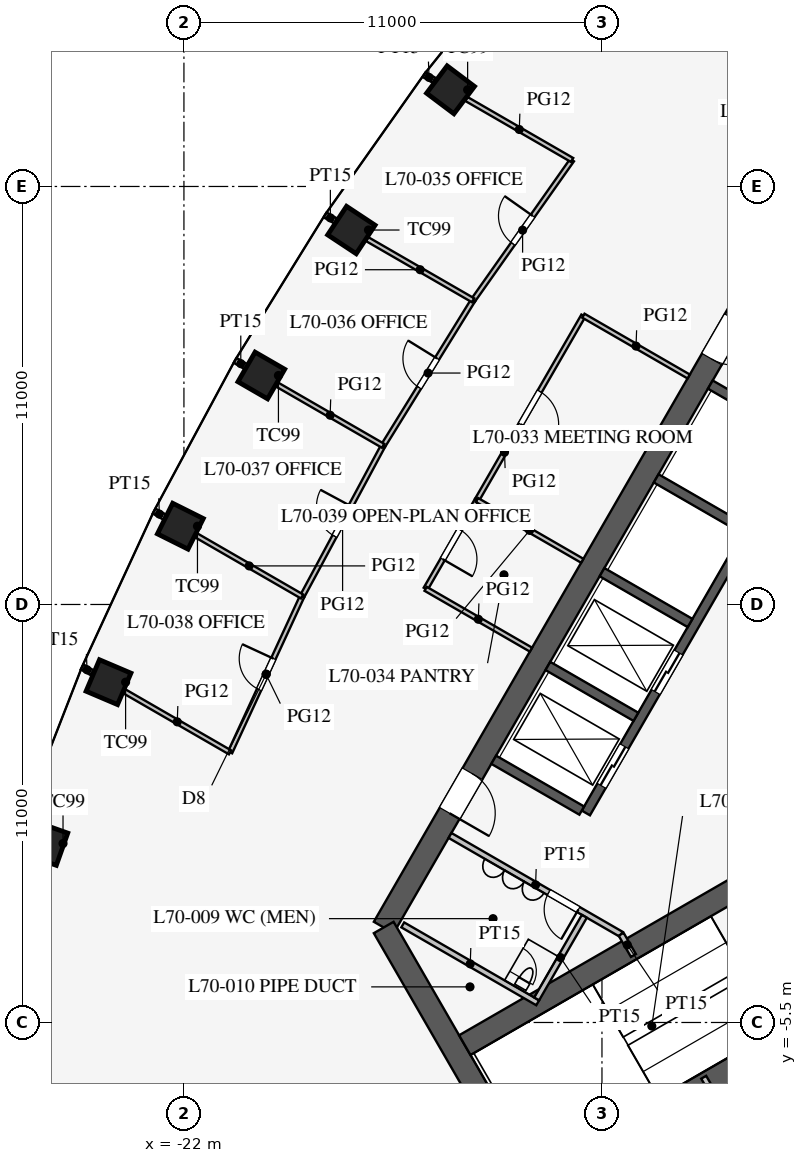
"""IFC4 building model, lengths in metres.
Left out: names, types, materials, properties, quantities, classifications, styles, units other than length and angle.
Written with IfcOpenShell. Run it as: python <this file> out.ifc"""

import sys

from ifc_helpers import new_model, si_unit, direction, frame, frame_2d, origin, origin_2d, place, context, subcontext, project, spatial, rectangle, extrude, element, fill, save


model = new_model("IFC4")
c1 = context("Model", 3, precision=1e-05, world=origin(), true_north=direction((0.0, 1.0)))
c2 = subcontext(c1, "Body", "Model", "MODEL_VIEW")
j1 = project(units=[si_unit("LENGTHUNIT", "METRE"), si_unit("PLANEANGLEUNIT", "RADIAN")], contexts=[c1])
p1 = place(None, origin())
s1 = spatial("IfcSite", under=j1, at=p1, CompositionType="ELEMENT")
p2 = place(p1, origin())
s2 = spatial("IfcBuilding", under=s1, at=p2, CompositionType="ELEMENT")
p3 = place(p2, frame((0.0, 0.0, 305.7)))
s3 = spatial("IfcBuildingStorey", under=s2, at=p3, CompositionType="ELEMENT", Elevation=305.7)
for number, where, z_axis, x_axis in (
    (1, (-14.985, 19.044, 0.0), (0.0, 0.0, 1.0), (-0.601, -0.799, 0.0)),
    (2, (-17.594, 15.354, 0.0), (0.0, 0.0, 1.0), (-0.552, -0.834, 0.0)),
    (3, (-19.963, 11.526, 0.0), (0.0, 0.0, 1.0), (-0.5, -0.866, 0.0)),
    (4, (-22.094, 7.56, 0.0), (0.0, 0.0, 1.0), (-0.447, -0.895, 0.0)),
    (5, (-23.985, 3.455, 0.0), (0.0, 0.0, 1.0), (-0.391, -0.92, 0.0)),
    (6, (-25.632, -0.79, 0.0), (0.0, 0.0, 1.0), (-0.334, -0.942, 0.0)),
):
    element("IfcColumn", number, at=place(p3, frame(where, z_axis=z_axis, x_axis=x_axis)), inside=s3, PredefinedType="COLUMN", context=c2, shape_type="SweptSolid", body=[
        extrude(rectangle(XDim=0.9, YDim=0.9, at=origin_2d()), origin(), (0.0, 0.0, 1.0), 4.2),
    ])
p4 = place(p3, frame((-5.773, 16.0, 0.0), z_axis=(0.0, 0.0, 1.0), x_axis=(-0.500002442456, -0.866023993627, 0.0)))
e7 = element("IfcWall", 7, at=p4, inside=s3, PredefinedType="SHEAR", context=c2, shape_type="SweptSolid", body=[
    extrude(rectangle(XDim=21.939, YDim=0.6, at=frame_2d((10.97, 0.0))), origin(), (0.0, 0.0, 1.0), 4.2),
])
p5 = place(p4, frame((17.27, 0.0, 0.0)))
e8 = element("IfcOpeningElement", 8, at=p5, cuts=e7, PredefinedType="OPENING", context=c2, shape_type="SweptSolid", body=[
    extrude(rectangle(XDim=1.2, YDim=2.1, at=frame_2d((0.6, 1.05))), frame((0.0, 0.31, 0.0), z_axis=(0.0, -1.0, 0.0), x_axis=(1.0, 0.0, 0.0)), (0.0, 0.0, 1.0), 0.62),
])
p6 = place(p4, frame((3.47, 0.0, 0.0)))
e9 = element("IfcOpeningElement", 9, at=p6, cuts=e7, PredefinedType="OPENING", context=c2, shape_type="SweptSolid", body=[
    extrude(rectangle(XDim=1.2, YDim=2.1, at=frame_2d((0.6, 1.05))), frame((0.0, 0.31, 0.0), z_axis=(0.0, -1.0, 0.0), x_axis=(1.0, 0.0, 0.0)), (0.0, 0.0, 1.0), 0.62),
])
p7 = place(p3, frame((-16.743, -3.0, 0.0), z_axis=(0.0, 0.0, 1.0), x_axis=(0.499995765644, -0.866027848477, 0.0)))
e10 = element("IfcWall", 10, at=p7, inside=s3, PredefinedType="SHEAR", context=c2, shape_type="SweptSolid", body=[
    extrude(rectangle(XDim=11.547, YDim=0.6, at=frame_2d((5.773, 0.0))), origin(), (0.0, 0.0, 1.0), 4.2),
])
p8 = place(p3, frame((-5.724, 9.886, 0.0), z_axis=(0.0, 0.0, 1.0), x_axis=(-0.500001763848, -0.866024385424, 0.0)))
e11 = element("IfcWall", 11, at=p8, inside=s3, PredefinedType="SHEAR", context=c2, shape_type="SweptSolid", body=[
    extrude(rectangle(XDim=11.4, YDim=0.25, at=frame_2d((5.7, 0.0))), origin(), (0.0, 0.0, 1.0), 4.2),
])
p9 = place(p8, frame((6.525, 0.0, 0.0)))
e12 = element("IfcOpeningElement", 12, at=p9, cuts=e11, PredefinedType="OPENING", context=c2, shape_type="SweptSolid", body=[
    extrude(rectangle(XDim=1.2, YDim=2.2, at=frame_2d((0.6, 1.1))), frame((0.0, 0.135, 0.0), z_axis=(0.0, -1.0, 0.0), x_axis=(1.0, 0.0, 0.0)), (0.0, 0.0, 1.0), 0.27),
])
p10 = place(p8, frame((9.375, 0.0, 0.0)))
e13 = element("IfcOpeningElement", 13, at=p10, cuts=e11, PredefinedType="OPENING", context=c2, shape_type="SweptSolid", body=[
    extrude(rectangle(XDim=1.2, YDim=2.2, at=frame_2d((0.6, 1.1))), frame((0.0, 0.135, 0.0), z_axis=(0.0, -1.0, 0.0), x_axis=(1.0, 0.0, 0.0)), (0.0, 0.0, 1.0), 0.27),
])
for number, where, z_axis, x_axis in (
    (14, (-5.832, 9.949, 0.0), (0.0, 0.0, 1.0), (-0.866, 0.5, 0.0)),
    (15, (-7.257, 7.481, 0.0), (0.0, 0.0, 1.0), (-0.866, 0.5, 0.0)),
    (16, (-8.682, 5.012, 0.0), (0.0, 0.0, 1.0), (-0.866, 0.5, 0.0)),
    (17, (-10.107, 2.544, 0.0), (0.0, 0.0, 1.0), (-0.866, 0.5, 0.0)),
    (18, (-11.532, 0.076, 0.0), (0.0, 0.0, 1.0), (-0.866, 0.5, 0.0)),
):
    element("IfcWall", number, at=place(p3, frame(where, z_axis=z_axis, x_axis=x_axis)), inside=s3, PredefinedType="SHEAR", context=c2, shape_type="SweptSolid", body=[
        extrude(rectangle(XDim=2.675, YDim=0.25, at=frame_2d((1.337, 0.0))), origin(), (0.0, 0.0, 1.0), 4.2),
    ])
p11 = place(p3, frame((-6.663, -1.509, 0.0), z_axis=(0.0, 0.0, 1.0), x_axis=(-0.86603049496, -0.499991181721, 0.0)))
e19 = element("IfcWall", 19, at=p11, inside=s3, PredefinedType="SHEAR", context=c2, shape_type="SweptSolid", body=[
    extrude(rectangle(XDim=9.175, YDim=0.6, at=frame_2d((4.587, 0.0))), origin(), (0.0, 0.0, 1.0), 4.2),
])
p12 = place(p3, frame((-4.638, -5.016, 0.0), z_axis=(0.0, 0.0, 1.0), x_axis=(-0.866012320003, -0.50002266109, 0.0)))
e20 = element("IfcWall", 20, at=p12, inside=s3, PredefinedType="SHEAR", context=c2, shape_type="SweptSolid", body=[
    extrude(rectangle(XDim=9.175, YDim=0.6, at=frame_2d((4.587, 0.0))), origin(), (0.0, 0.0, 1.0), 4.2),
])
p13 = place(p3, frame((-10.495, -3.178, 0.0), z_axis=(0.0, 0.0, 1.0), x_axis=(-0.866021400173, 0.500006934395, 0.0)))
e21 = element("IfcWall", 21, at=p13, inside=s3, PredefinedType="PARTITIONING", context=c2, shape_type="SweptSolid", body=[
    extrude(rectangle(XDim=5.2, YDim=0.15, at=frame_2d((2.6, 0.0))), origin(), (0.0, 0.0, 1.0), 4.0),
])
p14 = place(p13, frame((1.3, 0.0, 0.0)))
e22 = element("IfcOpeningElement", 22, at=p14, cuts=e21, PredefinedType="OPENING", context=c2, shape_type="SweptSolid", body=[
    extrude(rectangle(XDim=0.9, YDim=2.1, at=frame_2d((0.45, 1.05))), frame((0.0, 0.085, 0.0), z_axis=(0.0, -1.0, 0.0), x_axis=(1.0, 0.0, 0.0)), (0.0, 0.0, 1.0), 0.17),
])
for number, where, z_axis, x_axis in (
    (23, (-10.495, -3.178, 0.0), (0.0, 0.0, 1.0), (0.5, -0.866, 0.0)),
    (24, (-8.0, -7.5, 0.0), (0.0, 0.0, 1.0), (-0.5, 0.866, 0.0)),
):
    element("IfcWall", number, at=place(p3, frame(where, z_axis=z_axis, x_axis=x_axis)), inside=s3, PredefinedType="PARTITIONING", context=c2, shape_type="SweptSolid", body=[
        extrude(rectangle(XDim=0.645, YDim=0.15, at=frame_2d((0.323, 0.0))), origin(), (0.0, 0.0, 1.0), 4.0),
    ])
p15 = place(p3, frame((-12.691, -4.982, 0.0), z_axis=(0.0, 0.0, 1.0), x_axis=(-0.8660249478, 0.500000789788, 0.0)))
e25 = element("IfcWall", 25, at=p15, inside=s3, PredefinedType="PARTITIONING", context=c2, shape_type="SweptSolid", body=[
    extrude(rectangle(XDim=4.1, YDim=0.15, at=frame_2d((2.05, 0.0))), origin(), (0.0, 0.0, 1.0), 4.0),
])
p16 = place(p3, frame((-11.464, -2.706, 0.0), z_axis=(0.0, 0.0, 1.0), x_axis=(-0.50001992892, -0.866013897511, 0.0)))
e26 = element("IfcWall", 26, at=p16, inside=s3, PredefinedType="PARTITIONING", context=c2, shape_type="SweptSolid", body=[
    extrude(rectangle(XDim=2.51, YDim=0.15, at=frame_2d((1.255, 0.0))), origin(), (0.0, 0.0, 1.0), 4.0),
])
p17 = place(p3, frame((-14.289, 8.25, 0.0), z_axis=(0.0, 0.0, 1.0), x_axis=(-0.50000943426, -0.866019956843, 0.0)))
e27 = element("IfcWall", 27, at=p17, inside=s3, PredefinedType="PARTITIONING", context=c2, shape_type="SweptSolid", body=[
    extrude(rectangle(XDim=2.7, YDim=0.12, at=frame_2d((1.35, 0.0))), origin(), (0.0, 0.0, 1.0), 2.9),
])
p18 = place(p17, frame((0.9, 0.0, 0.15)))
e28 = element("IfcOpeningElement", 28, at=p18, cuts=e27, PredefinedType="OPENING", context=c2, shape_type="SweptSolid", body=[
    extrude(rectangle(XDim=0.9, YDim=2.1, at=frame_2d((0.45, 1.05))), frame((0.0, 0.07, 0.0), z_axis=(0.0, -1.0, 0.0), x_axis=(1.0, 0.0, 0.0)), (0.0, 0.0, 1.0), 0.14),
])
p19 = place(p3, frame((-11.49, 13.1, 0.0), z_axis=(0.0, 0.0, 1.0), x_axis=(-0.499965239061, -0.866045472092, 0.0)))
e29 = element("IfcWall", 29, at=p19, inside=s3, PredefinedType="PARTITIONING", context=c2, shape_type="SweptSolid", body=[
    extrude(rectangle(XDim=5.6, YDim=0.12, at=frame_2d((2.8, 0.0))), origin(), (0.0, 0.0, 1.0), 2.9),
])
p20 = place(p19, frame((2.3, 0.0, 0.15)))
e30 = element("IfcOpeningElement", 30, at=p20, cuts=e29, PredefinedType="OPENING", context=c2, shape_type="SweptSolid", body=[
    extrude(rectangle(XDim=1.0, YDim=2.1, at=frame_2d((0.5, 1.05))), frame((0.0, 0.07, 0.0), z_axis=(0.0, -1.0, 0.0), x_axis=(1.0, 0.0, 0.0)), (0.0, 0.0, 1.0), 0.14),
])
for number, where, z_axis, x_axis in (
    (31, (-12.868, 4.312, 0.0), (0.0, 0.0, 1.0), (-0.866, 0.5, 0.0)),
    (32, (-11.518, 6.65, 0.0), (0.0, 0.0, 1.0), (-0.866, 0.5, 0.0)),
):
    element("IfcWall", number, at=place(p3, frame(where, z_axis=z_axis, x_axis=x_axis)), inside=s3, PredefinedType="PARTITIONING", context=c2, shape_type="SweptSolid", body=[
        extrude(rectangle(XDim=3.2, YDim=0.12, at=frame_2d((1.6, 0.0))), origin(), (0.0, 0.0, 1.0), 2.9),
    ])
p21 = place(p3, frame((-8.718, 11.5, 0.0), z_axis=(0.0, 0.0, 1.0), x_axis=(-0.866028054938, 0.499995408039, 0.0)))
e33 = element("IfcWall", 33, at=p21, inside=s3, PredefinedType="PARTITIONING", context=c2, shape_type="SweptSolid", body=[
    extrude(rectangle(XDim=3.2, YDim=0.12, at=frame_2d((1.6, 0.0))), origin(), (0.0, 0.0, 1.0), 2.9),
])
p22 = place(p3, frame((-20.356, 11.753, 0.0), z_axis=(0.0, 0.0, 1.0), x_axis=(-0.865899514186, 0.500217983815, 0.0)))
e34 = element("IfcWall", 34, at=p22, inside=s3, PredefinedType="PARTITIONING", context=c2, shape_type="SweptSolid", body=[
    extrude(rectangle(XDim=0.341, YDim=0.15, at=frame_2d((0.17, 0.0))), origin(), (0.0, 0.0, 1.0), 2.9),
])
p23 = place(p3, frame((-22.51, 7.8, 0.0), z_axis=(0.0, 0.0, 1.0), x_axis=(-0.866095534226, 0.499878510834, 0.0)))
e35 = element("IfcWall", 35, at=p23, inside=s3, PredefinedType="PARTITIONING", context=c2, shape_type="SweptSolid", body=[
    extrude(rectangle(XDim=0.316, YDim=0.15, at=frame_2d((0.158, 0.0))), origin(), (0.0, 0.0, 1.0), 2.9),
])
p24 = place(p3, frame((-24.422, 3.708, 0.0), z_axis=(0.0, 0.0, 1.0), x_axis=(-0.866254317358, 0.499603300288, 0.0)))
e36 = element("IfcWall", 36, at=p24, inside=s3, PredefinedType="PARTITIONING", context=c2, shape_type="SweptSolid", body=[
    extrude(rectangle(XDim=0.296, YDim=0.15, at=frame_2d((0.148, 0.0))), origin(), (0.0, 0.0, 1.0), 2.9),
])
p25 = place(p3, frame((-18.01, 15.594, 0.0), z_axis=(0.0, 0.0, 1.0), x_axis=(-0.866095534226, 0.499878510834, 0.0)))
e37 = element("IfcWall", 37, at=p25, inside=s3, PredefinedType="PARTITIONING", context=c2, shape_type="SweptSolid", body=[
    extrude(rectangle(XDim=0.316, YDim=0.15, at=frame_2d((0.158, 0.0))), origin(), (0.0, 0.0, 1.0), 2.9),
])
p26 = place(p3, frame((-15.422, 19.296, 0.0), z_axis=(0.0, 0.0, 1.0), x_axis=(-0.865896854829, 0.500222587251, 0.0)))
e38 = element("IfcWall", 38, at=p26, inside=s3, PredefinedType="PARTITIONING", context=c2, shape_type="SweptSolid", body=[
    extrude(rectangle(XDim=0.296, YDim=0.15, at=frame_2d((0.148, 0.0))), origin(), (0.0, 0.0, 1.0), 2.9),
])
p27 = place(p3, frame((-16.759, 9.676, 0.0), z_axis=(0.0, 0.0, 1.0), x_axis=(-0.473524102582, -0.880780860529, 0.0)))
e39 = element("IfcWall", 39, at=p27, inside=s3, PredefinedType="PARTITIONING", context=c2, shape_type="SweptSolid", body=[
    extrude(rectangle(XDim=4.502, YDim=0.12, at=frame_2d((2.251, 0.0))), origin(), (0.0, 0.0, 1.0), 2.9),
])
p28 = place(p27, frame((1.8, 0.0, 0.15)))
e40 = element("IfcOpeningElement", 40, at=p28, cuts=e39, PredefinedType="OPENING", context=c2, shape_type="SweptSolid", body=[
    extrude(rectangle(XDim=0.9, YDim=2.1, at=frame_2d((0.45, 1.05))), frame((0.0, 0.07, 0.0), z_axis=(0.0, -1.0, 0.0), x_axis=(1.0, 0.0, 0.0)), (0.0, 0.0, 1.0), 0.14),
])
p29 = place(p3, frame((-18.891, 5.71, 0.0), z_axis=(0.0, 0.0, 1.0), x_axis=(-0.419335693458, -0.907831248742, 0.0)))
e41 = element("IfcWall", 41, at=p29, inside=s3, PredefinedType="PARTITIONING", context=c2, shape_type="SweptSolid", body=[
    extrude(rectangle(XDim=4.519, YDim=0.12, at=frame_2d((2.259, 0.0))), origin(), (0.0, 0.0, 1.0), 2.9),
])
p30 = place(p29, frame((1.8, 0.0, 0.15)))
e42 = element("IfcOpeningElement", 42, at=p30, cuts=e41, PredefinedType="OPENING", context=c2, shape_type="SweptSolid", body=[
    extrude(rectangle(XDim=0.9, YDim=2.1, at=frame_2d((0.45, 1.05))), frame((0.0, 0.07, 0.0), z_axis=(0.0, -1.0, 0.0), x_axis=(1.0, 0.0, 0.0)), (0.0, 0.0, 1.0), 0.14),
])
p31 = place(p3, frame((-14.391, 13.505, 0.0), z_axis=(0.0, 0.0, 1.0), x_axis=(-0.525996140194, -0.850486954927, 0.0)))
e43 = element("IfcWall", 43, at=p31, inside=s3, PredefinedType="PARTITIONING", context=c2, shape_type="SweptSolid", body=[
    extrude(rectangle(XDim=4.502, YDim=0.12, at=frame_2d((2.251, 0.0))), origin(), (0.0, 0.0, 1.0), 2.9),
])
p32 = place(p31, frame((1.8, 0.0, 0.15)))
e44 = element("IfcOpeningElement", 44, at=p32, cuts=e43, PredefinedType="OPENING", context=c2, shape_type="SweptSolid", body=[
    extrude(rectangle(XDim=0.9, YDim=2.1, at=frame_2d((0.45, 1.05))), frame((0.0, 0.07, 0.0), z_axis=(0.0, -1.0, 0.0), x_axis=(1.0, 0.0, 0.0)), (0.0, 0.0, 1.0), 0.14),
])
p33 = place(p3, frame((-11.786, 17.197, 0.0), z_axis=(0.0, 0.0, 1.0), x_axis=(-0.576562277172, -0.817053205454, 0.0)))
e45 = element("IfcWall", 45, at=p33, inside=s3, PredefinedType="PARTITIONING", context=c2, shape_type="SweptSolid", body=[
    extrude(rectangle(XDim=4.519, YDim=0.12, at=frame_2d((2.259, 0.0))), origin(), (0.0, 0.0, 1.0), 2.9),
])
p34 = place(p33, frame((1.8, 0.0, 0.15)))
e46 = element("IfcOpeningElement", 46, at=p34, cuts=e45, PredefinedType="OPENING", context=c2, shape_type="SweptSolid", body=[
    extrude(rectangle(XDim=0.9, YDim=2.1, at=frame_2d((0.45, 1.05))), frame((0.0, 0.07, 0.0), z_axis=(0.0, -1.0, 0.0), x_axis=(1.0, 0.0, 0.0)), (0.0, 0.0, 1.0), 0.14),
])
p35 = place(p3, frame((-16.759, 9.676, 0.0), z_axis=(0.0, 0.0, 1.0), x_axis=(-0.866008816382, 0.500028729123, 0.0)))
e47 = element("IfcWall", 47, at=p35, inside=s3, PredefinedType="PARTITIONING", context=c2, shape_type="SweptSolid", body=[
    extrude(rectangle(XDim=3.22, YDim=0.12, at=frame_2d((1.61, 0.0))), origin(), (0.0, 0.0, 1.0), 2.9),
])
p36 = place(p3, frame((-18.891, 5.71, 0.0), z_axis=(0.0, 0.0, 1.0), x_axis=(-0.866021328928, 0.500007057792, 0.0)))
e48 = element("IfcWall", 48, at=p36, inside=s3, PredefinedType="PARTITIONING", context=c2, shape_type="SweptSolid", body=[
    extrude(rectangle(XDim=3.218, YDim=0.12, at=frame_2d((1.609, 0.0))), origin(), (0.0, 0.0, 1.0), 2.9),
])
p37 = place(p3, frame((-20.786, 1.608, 0.0), z_axis=(0.0, 0.0, 1.0), x_axis=(-0.866039964284, 0.499974779627, 0.0)))
e49 = element("IfcWall", 49, at=p37, inside=s3, PredefinedType="PARTITIONING", context=c2, shape_type="SweptSolid", body=[
    extrude(rectangle(XDim=3.211, YDim=0.12, at=frame_2d((1.605, 0.0))), origin(), (0.0, 0.0, 1.0), 2.9),
])
p38 = place(p3, frame((-14.391, 13.505, 0.0), z_axis=(0.0, 0.0, 1.0), x_axis=(-0.866054182849, 0.499950149885, 0.0)))
e50 = element("IfcWall", 50, at=p38, inside=s3, PredefinedType="PARTITIONING", context=c2, shape_type="SweptSolid", body=[
    extrude(rectangle(XDim=3.218, YDim=0.12, at=frame_2d((1.609, 0.0))), origin(), (0.0, 0.0, 1.0), 2.9),
])
p39 = place(p3, frame((-11.786, 17.197, 0.0), z_axis=(0.0, 0.0, 1.0), x_axis=(-0.866039964284, 0.499974779627, 0.0)))
e51 = element("IfcWall", 51, at=p39, inside=s3, PredefinedType="PARTITIONING", context=c2, shape_type="SweptSolid", body=[
    extrude(rectangle(XDim=3.211, YDim=0.12, at=frame_2d((1.605, 0.0))), origin(), (0.0, 0.0, 1.0), 2.9),
])
p40 = place(p14, origin())
e52 = element("IfcDoor", 52, at=p40, inside=s3, OperationType="SINGLE_SWING_LEFT", PredefinedType="DOOR", context=c2, shape_type="SweptSolid", body=[
    extrude(rectangle(XDim=0.9, YDim=2.1, at=frame_2d((0.45, 1.05))), frame((0.0, 0.025, 0.0), z_axis=(0.0, -1.0, 0.0), x_axis=(1.0, 0.0, 0.0)), (0.0, 0.0, 1.0), 0.05),
])
fill(e22, e52)
p41 = place(p5, origin())
e53 = element("IfcDoor", 53, at=p41, inside=s3, OperationType="SINGLE_SWING_RIGHT", PredefinedType="DOOR", context=c2, shape_type="SweptSolid", body=[
    extrude(rectangle(XDim=1.2, YDim=2.1, at=frame_2d((0.6, 1.05))), frame((0.0, 0.025, 0.0), z_axis=(0.0, -1.0, 0.0), x_axis=(1.0, 0.0, 0.0)), (0.0, 0.0, 1.0), 0.05),
])
fill(e8, e53)
p42 = place(p6, origin())
e54 = element("IfcDoor", 54, at=p42, inside=s3, OperationType="SINGLE_SWING_LEFT", PredefinedType="DOOR", context=c2, shape_type="SweptSolid", body=[
    extrude(rectangle(XDim=1.2, YDim=2.1, at=frame_2d((0.6, 1.05))), frame((0.0, 0.025, 0.0), z_axis=(0.0, -1.0, 0.0), x_axis=(1.0, 0.0, 0.0)), (0.0, 0.0, 1.0), 0.05),
])
fill(e9, e54)
p43 = place(p20, origin())
e55 = element("IfcDoor", 55, at=p43, inside=s3, OperationType="SINGLE_SWING_RIGHT", PredefinedType="DOOR", context=c2, shape_type="SweptSolid", body=[
    extrude(rectangle(XDim=1.0, YDim=2.1, at=frame_2d((0.5, 1.05))), frame((0.0, 0.025, 0.0), z_axis=(0.0, -1.0, 0.0), x_axis=(1.0, 0.0, 0.0)), (0.0, 0.0, 1.0), 0.05),
])
fill(e30, e55)
p44 = place(p18, origin())
e56 = element("IfcDoor", 56, at=p44, inside=s3, OperationType="SINGLE_SWING_RIGHT", PredefinedType="DOOR", context=c2, shape_type="SweptSolid", body=[
    extrude(rectangle(XDim=0.9, YDim=2.1, at=frame_2d((0.45, 1.05))), frame((0.0, 0.025, 0.0), z_axis=(0.0, -1.0, 0.0), x_axis=(1.0, 0.0, 0.0)), (0.0, 0.0, 1.0), 0.05),
])
fill(e28, e56)
p45 = place(p34, frame((0.9, 0.0, 0.0), z_axis=(0.0, 0.0, 1.0), x_axis=(-1.0, 0.0, 0.0)))
e57 = element("IfcDoor", 57, at=p45, inside=s3, OperationType="SINGLE_SWING_RIGHT", PredefinedType="DOOR", context=c2, shape_type="SweptSolid", body=[
    extrude(rectangle(XDim=0.9, YDim=2.1, at=frame_2d((0.45, 1.05))), frame((0.0, 0.025, 0.0), z_axis=(0.0, -1.0, 0.0), x_axis=(1.0, 0.0, 0.0)), (0.0, 0.0, 1.0), 0.05),
])
fill(e46, e57)
p46 = place(p32, frame((0.9, 0.0, 0.0), z_axis=(0.0, 0.0, 1.0), x_axis=(-1.0, 0.0, 0.0)))
e58 = element("IfcDoor", 58, at=p46, inside=s3, OperationType="SINGLE_SWING_RIGHT", PredefinedType="DOOR", context=c2, shape_type="SweptSolid", body=[
    extrude(rectangle(XDim=0.9, YDim=2.1, at=frame_2d((0.45, 1.05))), frame((0.0, 0.025, 0.0), z_axis=(0.0, -1.0, 0.0), x_axis=(1.0, 0.0, 0.0)), (0.0, 0.0, 1.0), 0.05),
])
fill(e44, e58)
p47 = place(p28, frame((0.9, 0.0, 0.0), z_axis=(0.0, 0.0, 1.0), x_axis=(-1.0, 0.0, 0.0)))
e59 = element("IfcDoor", 59, at=p47, inside=s3, OperationType="SINGLE_SWING_RIGHT", PredefinedType="DOOR", context=c2, shape_type="SweptSolid", body=[
    extrude(rectangle(XDim=0.9, YDim=2.1, at=frame_2d((0.45, 1.05))), frame((0.0, 0.025, 0.0), z_axis=(0.0, -1.0, 0.0), x_axis=(1.0, 0.0, 0.0)), (0.0, 0.0, 1.0), 0.05),
])
fill(e40, e59)
p48 = place(p30, frame((0.9, 0.0, 0.0), z_axis=(0.0, 0.0, 1.0), x_axis=(-1.0, 0.0, 0.0)))
e60 = element("IfcDoor", 60, at=p48, inside=s3, OperationType="SINGLE_SWING_RIGHT", PredefinedType="DOOR", context=c2, shape_type="SweptSolid", body=[
    extrude(rectangle(XDim=0.9, YDim=2.1, at=frame_2d((0.45, 1.05))), frame((0.0, 0.025, 0.0), z_axis=(0.0, -1.0, 0.0), x_axis=(1.0, 0.0, 0.0)), (0.0, 0.0, 1.0), 0.05),
])
fill(e42, e60)
p49 = place(p9, origin())
e61 = element("IfcDoor", 61, at=p49, inside=s3, OperationType="DOUBLE_DOOR_SLIDING", PredefinedType="DOOR", context=c2, shape_type="SweptSolid", body=[
    extrude(rectangle(XDim=1.2, YDim=2.2, at=frame_2d((0.6, 1.1))), frame((0.0, 0.025, 0.0), z_axis=(0.0, -1.0, 0.0), x_axis=(1.0, 0.0, 0.0)), (0.0, 0.0, 1.0), 0.05),
])
fill(e12, e61)
p50 = place(p10, origin())
e62 = element("IfcDoor", 62, at=p50, inside=s3, OperationType="DOUBLE_DOOR_SLIDING", PredefinedType="DOOR", context=c2, shape_type="SweptSolid", body=[
    extrude(rectangle(XDim=1.2, YDim=2.2, at=frame_2d((0.6, 1.1))), frame((0.0, 0.025, 0.0), z_axis=(0.0, -1.0, 0.0), x_axis=(1.0, 0.0, 0.0)), (0.0, 0.0, 1.0), 0.05),
])
fill(e13, e62)
save(model, sys.argv[1])
